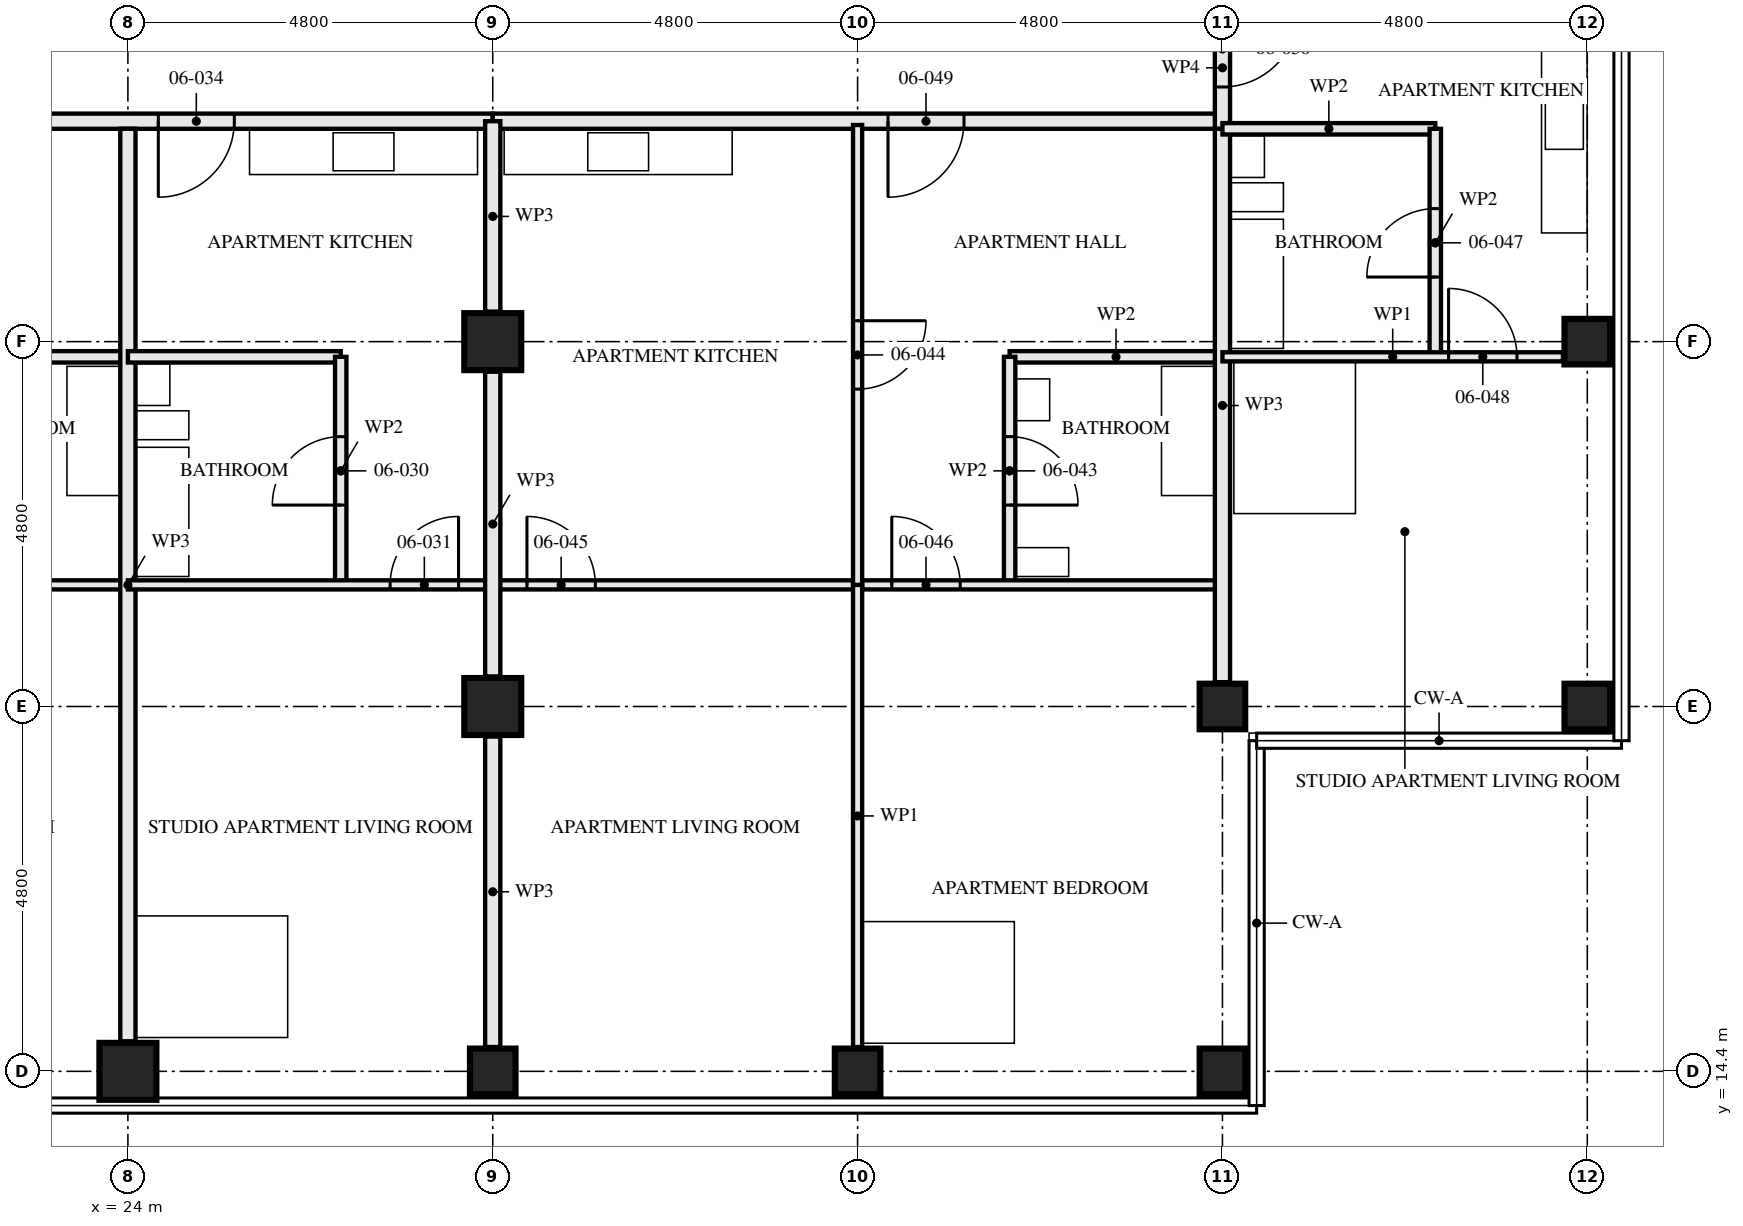
"""IFC4 building model, lengths in metres.
Left out: names, types, materials, properties, quantities, classifications, styles, units other than length and angle.
Written with IfcOpenShell. Run it as: python <this file> out.ifc"""

import sys

from ifc_helpers import new_model, si_unit, direction, frame, frame_2d, origin, origin_2d, place, context, subcontext, project, spatial, rectangle, hollow_rectangle, extrude, element, fill, save


model = new_model("IFC4")
c1 = context("Model", 3, precision=1e-05, world=origin(), true_north=direction((0.0, 1.0)))
c2 = subcontext(c1, "Body", "Model", "MODEL_VIEW")
j1 = project(units=[si_unit("LENGTHUNIT", "METRE"), si_unit("PLANEANGLEUNIT", "RADIAN")], contexts=[c1])
p1 = place(None, origin())
s1 = spatial("IfcSite", under=j1, at=p1, CompositionType="ELEMENT")
p2 = place(p1, origin())
s2 = spatial("IfcBuilding", under=s1, at=p2, CompositionType="ELEMENT")
p3 = place(p2, frame((0.0, 0.0, 27.0)))
s3 = spatial("IfcBuildingStorey", under=s2, at=p3, CompositionType="ELEMENT", Elevation=27.0)
p4 = place(p3, frame((24.0, 14.4, 0.0), z_axis=(0.0, 0.0, 1.0), x_axis=(0.0, 1.0, 0.0)))
e1 = element("IfcColumn", 1, at=p4, inside=s3, PredefinedType="COLUMN", context=c2, shape_type="SweptSolid", body=[
    extrude(hollow_rectangle(XDim=0.75, YDim=0.75, WallThickness=0.08, at=origin_2d()), origin(), (0.0, 0.0, 1.0), 3.5),
])
p5 = place(p3, frame((28.8, 14.4, 0.0), z_axis=(0.0, 0.0, 1.0), x_axis=(0.0, 1.0, 0.0)))
e2 = element("IfcColumn", 2, at=p5, inside=s3, PredefinedType="COLUMN", context=c2, shape_type="SweptSolid", body=[
    extrude(hollow_rectangle(XDim=0.6, YDim=0.6, WallThickness=0.08, at=origin_2d()), origin(), (0.0, 0.0, 1.0), 3.5),
])
for number, where, z_axis, x_axis in (
    (3, (28.8, 19.2, 0.0), (0.0, 0.0, 1.0), (1.0, 0.0, 0.0)),
    (4, (28.8, 24.0, 0.0), (0.0, 0.0, 1.0), (1.0, 0.0, 0.0)),
):
    element("IfcColumn", number, at=place(p3, frame(where, z_axis=z_axis, x_axis=x_axis)), inside=s3, PredefinedType="COLUMN", context=c2, shape_type="SweptSolid", body=[
        extrude(hollow_rectangle(XDim=0.75, YDim=0.75, WallThickness=0.08, at=origin_2d()), origin(), (0.0, 0.0, 1.0), 3.5),
    ])
for number, where, z_axis, x_axis in (
    (5, (33.6, 14.4, 0.0), (0.0, 0.0, 1.0), (0.0, 1.0, 0.0)),
    (6, (38.4, 14.4, 0.0), (0.0, 0.0, 1.0), (0.0, 1.0, 0.0)),
    (7, (38.4, 19.2, 0.0), (0.0, 0.0, 1.0), (0.0, 1.0, 0.0)),
    (8, (43.2, 19.2, 0.0), (0.0, 0.0, 1.0), (0.0, 1.0, 0.0)),
    (9, (43.2, 24.0, 0.0), (0.0, 0.0, 1.0), (1.0, 0.0, 0.0)),
):
    element("IfcColumn", number, at=place(p3, frame(where, z_axis=z_axis, x_axis=x_axis)), inside=s3, PredefinedType="COLUMN", context=c2, shape_type="SweptSolid", body=[
        extrude(hollow_rectangle(XDim=0.6, YDim=0.6, WallThickness=0.08, at=origin_2d()), origin(), (0.0, 0.0, 1.0), 3.5),
    ])
p6 = place(p3, frame((21.2, 23.8, 0.0), z_axis=(0.0, 0.0, 1.0), x_axis=(1.0, 0.0, 0.0)))
e10 = element("IfcWall", 10, at=p6, inside=s3, PredefinedType="PARTITIONING", context=c2, shape_type="SweptSolid", body=[
    extrude(rectangle(XDim=2.8, YDim=0.15, at=frame_2d((1.4, 0.0))), origin(), (0.0, 0.0, 1.0), 3.33),
])
p7 = place(p3, frame((19.2, 20.8, 0.0), z_axis=(0.0, 0.0, 1.0), x_axis=(1.0, 0.0, 0.0)))
e11 = element("IfcWall", 11, at=p7, inside=s3, PredefinedType="PARTITIONING", context=c2, shape_type="SweptSolid", body=[
    extrude(rectangle(XDim=4.8, YDim=0.12, at=frame_2d((2.4, 0.0))), origin(), (0.0, 0.0, 1.0), 3.33),
])
p8 = place(p7, frame((0.45, 0.0, 0.0)))
e12 = element("IfcOpeningElement", 12, at=p8, cuts=e11, PredefinedType="OPENING", context=c2, shape_type="SweptSolid", body=[
    extrude(rectangle(XDim=0.9, YDim=2.1, at=frame_2d((0.45, 1.05))), frame((0.0, 0.071, 0.0), z_axis=(0.0, -1.0, 0.0), x_axis=(1.0, 0.0, 0.0)), (0.0, 0.0, 1.0), 0.141),
])
p9 = place(p3, frame((24.0, 14.795, 0.0), z_axis=(0.0, 0.0, 1.0), x_axis=(0.0, 1.0, 0.0)))
e13 = element("IfcWall", 13, at=p9, inside=s3, PredefinedType="PARTITIONING", context=c2, shape_type="SweptSolid", body=[
    extrude(rectangle(XDim=12.005, YDim=0.2, at=frame_2d((6.002, 0.0))), origin(), (0.0, 0.0, 1.0), 2.55),
])
p10 = place(p3, frame((26.8, 20.8, 0.0), z_axis=(0.0, 0.0, 1.0), x_axis=(0.0, 1.0, 0.0)))
e14 = element("IfcWall", 14, at=p10, inside=s3, PredefinedType="PARTITIONING", context=c2, shape_type="SweptSolid", body=[
    extrude(rectangle(XDim=3.0, YDim=0.15, at=frame_2d((1.5, 0.0))), origin(), (0.0, 0.0, 1.0), 3.33),
])
p11 = place(p10, frame((1.05, 0.0, 0.0)))
e15 = element("IfcOpeningElement", 15, at=p11, cuts=e14, PredefinedType="OPENING", context=c2, shape_type="SweptSolid", body=[
    extrude(rectangle(XDim=0.9, YDim=2.1, at=frame_2d((0.45, 1.05))), frame((0.0, 0.085, 0.0), z_axis=(0.0, -1.0, 0.0), x_axis=(1.0, 0.0, 0.0)), (0.0, 0.0, 1.0), 0.171),
])
p12 = place(p3, frame((24.0, 23.8, 0.0), z_axis=(0.0, 0.0, 1.0), x_axis=(1.0, 0.0, 0.0)))
e16 = element("IfcWall", 16, at=p12, inside=s3, PredefinedType="PARTITIONING", context=c2, shape_type="SweptSolid", body=[
    extrude(rectangle(XDim=2.8, YDim=0.15, at=frame_2d((1.4, 0.0))), origin(), (0.0, 0.0, 1.0), 3.33),
])
p13 = place(p3, frame((24.0, 20.8, 0.0), z_axis=(0.0, 0.0, 1.0), x_axis=(1.0, 0.0, 0.0)))
e17 = element("IfcWall", 17, at=p13, inside=s3, PredefinedType="PARTITIONING", context=c2, shape_type="SweptSolid", body=[
    extrude(rectangle(XDim=4.8, YDim=0.12, at=frame_2d((2.4, 0.0))), origin(), (0.0, 0.0, 1.0), 3.33),
])
p14 = place(p13, frame((3.45, 0.0, 0.0)))
e18 = element("IfcOpeningElement", 18, at=p14, cuts=e17, PredefinedType="OPENING", context=c2, shape_type="SweptSolid", body=[
    extrude(rectangle(XDim=0.9, YDim=2.1, at=frame_2d((0.45, 1.05))), frame((0.0, 0.071, 0.0), z_axis=(0.0, -1.0, 0.0), x_axis=(1.0, 0.0, 0.0)), (0.0, 0.0, 1.0), 0.141),
])
p15 = place(p3, frame((14.4, 26.9, 0.0), z_axis=(0.0, 0.0, 1.0), x_axis=(1.0, 0.0, 0.0)))
e19 = element("IfcWall", 19, at=p15, inside=s3, PredefinedType="PARTITIONING", context=c2, shape_type="SweptSolid", body=[
    extrude(rectangle(XDim=14.4, YDim=0.2, at=frame_2d((7.2, 0.0))), origin(), (0.0, 0.0, 1.0), 2.55),
])
p16 = place(p15, frame((1.4, 0.0, 0.0)))
e20 = element("IfcOpeningElement", 20, at=p16, cuts=e19, PredefinedType="OPENING", context=c2, shape_type="SweptSolid", body=[
    extrude(rectangle(XDim=1.0, YDim=2.1, at=frame_2d((0.5, 1.05))), frame((0.0, 0.111, 0.0), z_axis=(0.0, -1.0, 0.0), x_axis=(1.0, 0.0, 0.0)), (0.0, 0.0, 1.0), 0.221),
])
p17 = place(p15, frame((5.2, 0.0, 0.0)))
e21 = element("IfcOpeningElement", 21, at=p17, cuts=e19, PredefinedType="OPENING", context=c2, shape_type="SweptSolid", body=[
    extrude(rectangle(XDim=1.0, YDim=2.1, at=frame_2d((0.5, 1.05))), frame((0.0, 0.111, 0.0), z_axis=(0.0, -1.0, 0.0), x_axis=(1.0, 0.0, 0.0)), (0.0, 0.0, 1.0), 0.221),
])
p18 = place(p15, frame((10.0, 0.0, 0.0)))
e22 = element("IfcOpeningElement", 22, at=p18, cuts=e19, PredefinedType="OPENING", context=c2, shape_type="SweptSolid", body=[
    extrude(rectangle(XDim=1.0, YDim=2.1, at=frame_2d((0.5, 1.05))), frame((0.0, 0.111, 0.0), z_axis=(0.0, -1.0, 0.0), x_axis=(1.0, 0.0, 0.0)), (0.0, 0.0, 1.0), 0.221),
])
p19 = place(p3, frame((35.6, 20.8, 0.0), z_axis=(0.0, 0.0, 1.0), x_axis=(0.0, 1.0, 0.0)))
e23 = element("IfcWall", 23, at=p19, inside=s3, PredefinedType="PARTITIONING", context=c2, shape_type="SweptSolid", body=[
    extrude(rectangle(XDim=3.0, YDim=0.15, at=frame_2d((1.5, 0.0))), origin(), (0.0, 0.0, 1.0), 3.33),
])
p20 = place(p19, frame((1.05, 0.0, 0.0)))
e24 = element("IfcOpeningElement", 24, at=p20, cuts=e23, PredefinedType="OPENING", context=c2, shape_type="SweptSolid", body=[
    extrude(rectangle(XDim=0.9, YDim=2.1, at=frame_2d((0.45, 1.05))), frame((0.0, 0.085, 0.0), z_axis=(0.0, -1.0, 0.0), x_axis=(1.0, 0.0, 0.0)), (0.0, 0.0, 1.0), 0.171),
])
p21 = place(p3, frame((35.6, 23.8, 0.0), z_axis=(0.0, 0.0, 1.0), x_axis=(1.0, 0.0, 0.0)))
e25 = element("IfcWall", 25, at=p21, inside=s3, PredefinedType="PARTITIONING", context=c2, shape_type="SweptSolid", body=[
    extrude(rectangle(XDim=2.8, YDim=0.15, at=frame_2d((1.4, 0.0))), origin(), (0.0, 0.0, 1.0), 3.33),
])
p22 = place(p3, frame((33.6, 20.8, 0.0), z_axis=(0.0, 0.0, 1.0), x_axis=(0.0, 1.0, 0.0)))
e26 = element("IfcWall", 26, at=p22, inside=s3, PredefinedType="PARTITIONING", context=c2, shape_type="SweptSolid", body=[
    extrude(rectangle(XDim=6.05, YDim=0.12, at=frame_2d((3.025, 0.0))), origin(), (0.0, 0.0, 1.0), 2.55),
])
p23 = place(p22, frame((2.575, 0.0, 0.0)))
e27 = element("IfcOpeningElement", 27, at=p23, cuts=e26, PredefinedType="OPENING", context=c2, shape_type="SweptSolid", body=[
    extrude(rectangle(XDim=0.9, YDim=2.1, at=frame_2d((0.45, 1.05))), frame((0.0, 0.071, 0.0), z_axis=(0.0, -1.0, 0.0), x_axis=(1.0, 0.0, 0.0)), (0.0, 0.0, 1.0), 0.141),
])
p24 = place(p3, frame((28.8, 20.8, 0.0), z_axis=(0.0, 0.0, 1.0), x_axis=(1.0, 0.0, 0.0)))
e28 = element("IfcWall", 28, at=p24, inside=s3, PredefinedType="PARTITIONING", context=c2, shape_type="SweptSolid", body=[
    extrude(rectangle(XDim=4.8, YDim=0.12, at=frame_2d((2.4, 0.0))), origin(), (0.0, 0.0, 1.0), 3.33),
])
p25 = place(p24, frame((0.45, 0.0, 0.0)))
e29 = element("IfcOpeningElement", 29, at=p25, cuts=e28, PredefinedType="OPENING", context=c2, shape_type="SweptSolid", body=[
    extrude(rectangle(XDim=0.9, YDim=2.1, at=frame_2d((0.45, 1.05))), frame((0.0, 0.071, 0.0), z_axis=(0.0, -1.0, 0.0), x_axis=(1.0, 0.0, 0.0)), (0.0, 0.0, 1.0), 0.141),
])
p26 = place(p3, frame((33.6, 20.8, 0.0), z_axis=(0.0, 0.0, 1.0), x_axis=(1.0, 0.0, 0.0)))
e30 = element("IfcWall", 30, at=p26, inside=s3, PredefinedType="PARTITIONING", context=c2, shape_type="SweptSolid", body=[
    extrude(rectangle(XDim=4.8, YDim=0.12, at=frame_2d((2.4, 0.0))), origin(), (0.0, 0.0, 1.0), 3.33),
])
p27 = place(p26, frame((0.45, 0.0, 0.0)))
e31 = element("IfcOpeningElement", 31, at=p27, cuts=e30, PredefinedType="OPENING", context=c2, shape_type="SweptSolid", body=[
    extrude(rectangle(XDim=0.9, YDim=2.1, at=frame_2d((0.45, 1.05))), frame((0.0, 0.071, 0.0), z_axis=(0.0, -1.0, 0.0), x_axis=(1.0, 0.0, 0.0)), (0.0, 0.0, 1.0), 0.141),
])
p28 = place(p3, frame((33.6, 14.72, 0.0), z_axis=(0.0, 0.0, 1.0), x_axis=(0.0, 1.0, 0.0)))
e32 = element("IfcWall", 32, at=p28, inside=s3, PredefinedType="PARTITIONING", context=c2, shape_type="SweptSolid", body=[
    extrude(rectangle(XDim=6.08, YDim=0.12, at=frame_2d((3.04, 0.0))), origin(), (0.0, 0.0, 1.0), 2.55),
])
p29 = place(p3, frame((38.4, 19.52, 0.0), z_axis=(0.0, 0.0, 1.0), x_axis=(0.0, 1.0, 0.0)))
e33 = element("IfcWall", 33, at=p29, inside=s3, PredefinedType="PARTITIONING", context=c2, shape_type="SweptSolid", body=[
    extrude(rectangle(XDim=7.28, YDim=0.2, at=frame_2d((3.64, 0.0))), origin(), (0.0, 0.0, 1.0), 2.55),
])
p30 = place(p3, frame((41.2, 23.8, 0.0), z_axis=(0.0, 0.0, 1.0), x_axis=(0.0, 1.0, 0.0)))
e34 = element("IfcWall", 34, at=p30, inside=s3, PredefinedType="PARTITIONING", context=c2, shape_type="SweptSolid", body=[
    extrude(rectangle(XDim=3.0, YDim=0.15, at=frame_2d((1.5, 0.0))), origin(), (0.0, 0.0, 1.0), 2.55),
])
p31 = place(p30, frame((1.05, 0.0, 0.0)))
e35 = element("IfcOpeningElement", 35, at=p31, cuts=e34, PredefinedType="OPENING", context=c2, shape_type="SweptSolid", body=[
    extrude(rectangle(XDim=0.9, YDim=2.1, at=frame_2d((0.45, 1.05))), frame((0.0, 0.085, 0.0), z_axis=(0.0, -1.0, 0.0), x_axis=(1.0, 0.0, 0.0)), (0.0, 0.0, 1.0), 0.171),
])
p32 = place(p3, frame((38.4, 26.8, 0.0), z_axis=(0.0, 0.0, 1.0), x_axis=(1.0, 0.0, 0.0)))
e36 = element("IfcWall", 36, at=p32, inside=s3, PredefinedType="PARTITIONING", context=c2, shape_type="SweptSolid", body=[
    extrude(rectangle(XDim=2.8, YDim=0.15, at=frame_2d((1.4, 0.0))), origin(), (0.0, 0.0, 1.0), 3.33),
])
p33 = place(p3, frame((38.4, 23.8, 0.0), z_axis=(0.0, 0.0, 1.0), x_axis=(1.0, 0.0, 0.0)))
e37 = element("IfcWall", 37, at=p33, inside=s3, PredefinedType="PARTITIONING", context=c2, shape_type="SweptSolid", body=[
    extrude(rectangle(XDim=4.48, YDim=0.12, at=frame_2d((2.24, 0.0))), origin(), (0.0, 0.0, 1.0), 3.33),
])
p34 = place(p33, frame((2.975, 0.0, 0.0)))
e38 = element("IfcOpeningElement", 38, at=p34, cuts=e37, PredefinedType="OPENING", context=c2, shape_type="SweptSolid", body=[
    extrude(rectangle(XDim=0.9, YDim=2.1, at=frame_2d((0.45, 1.05))), frame((0.0, 0.071, 0.0), z_axis=(0.0, -1.0, 0.0), x_axis=(1.0, 0.0, 0.0)), (0.0, 0.0, 1.0), 0.141),
])
p35 = place(p3, frame((28.8, 26.9, 0.0), z_axis=(0.0, 0.0, 1.0), x_axis=(1.0, 0.0, 0.0)))
e39 = element("IfcWall", 39, at=p35, inside=s3, PredefinedType="PARTITIONING", context=c2, shape_type="SweptSolid", body=[
    extrude(rectangle(XDim=9.6, YDim=0.2, at=frame_2d((4.8, 0.0))), origin(), (0.0, 0.0, 1.0), 3.33),
])
p36 = place(p35, frame((5.2, 0.0, 0.0)))
e40 = element("IfcOpeningElement", 40, at=p36, cuts=e39, PredefinedType="OPENING", context=c2, shape_type="SweptSolid", body=[
    extrude(rectangle(XDim=1.0, YDim=2.1, at=frame_2d((0.5, 1.05))), frame((0.0, 0.111, 0.0), z_axis=(0.0, -1.0, 0.0), x_axis=(1.0, 0.0, 0.0)), (0.0, 0.0, 1.0), 0.221),
])
p37 = place(p3, frame((38.4, 26.8, 0.0), z_axis=(0.0, 0.0, 1.0), x_axis=(0.0, 1.0, 0.0)))
e41 = element("IfcWall", 41, at=p37, inside=s3, PredefinedType="PARTITIONING", context=c2, shape_type="SweptSolid", body=[
    extrude(rectangle(XDim=1.605, YDim=0.2, at=frame_2d((0.802, 0.0))), origin(), (0.0, 0.0, 1.0), 3.33),
])
p38 = place(p37, frame((0.55, 0.0, 0.0)))
e42 = element("IfcOpeningElement", 42, at=p38, cuts=e41, PredefinedType="OPENING", context=c2, shape_type="SweptSolid", body=[
    extrude(rectangle(XDim=1.0, YDim=2.1, at=frame_2d((0.5, 1.05))), frame((0.0, 0.111, 0.0), z_axis=(0.0, -1.0, 0.0), x_axis=(1.0, 0.0, 0.0)), (0.0, 0.0, 1.0), 0.221),
])
p39 = place(p3, frame((28.8, 14.72, 0.0), z_axis=(0.0, 0.0, 1.0), x_axis=(0.0, 1.0, 0.0)))
e43 = element("IfcWall", 43, at=p39, inside=s3, PredefinedType="PARTITIONING", context=c2, shape_type="SweptSolid", body=[
    extrude(rectangle(XDim=4.085, YDim=0.2, at=frame_2d((2.042, 0.0))), origin(), (0.0, 0.0, 1.0), 2.32),
])
p40 = place(p3, frame((28.8, 19.595, 0.0), z_axis=(0.0, 0.0, 1.0), x_axis=(0.0, 1.0, 0.0)))
e44 = element("IfcWall", 44, at=p40, inside=s3, PredefinedType="PARTITIONING", context=c2, shape_type="SweptSolid", body=[
    extrude(rectangle(XDim=4.01, YDim=0.2, at=frame_2d((2.005, 0.0))), origin(), (0.0, 0.0, 1.0), 2.32),
])
p41 = place(p3, frame((28.8, 24.395, 0.0), z_axis=(0.0, 0.0, 1.0), x_axis=(0.0, 1.0, 0.0)))
e45 = element("IfcWall", 45, at=p41, inside=s3, PredefinedType="PARTITIONING", context=c2, shape_type="SweptSolid", body=[
    extrude(rectangle(XDim=2.505, YDim=0.2, at=frame_2d((1.252, 0.0))), origin(), (0.0, 0.0, 1.0), 2.32),
])
p42 = place(p11, origin())
e46 = element("IfcDoor", 46, at=p42, inside=s3, OperationType="SINGLE_SWING_RIGHT", PredefinedType="DOOR", context=c2, shape_type="SweptSolid", body=[
    extrude(rectangle(XDim=0.9, YDim=2.1, at=frame_2d((0.45, 1.05))), frame((0.0, 0.022, 0.0), z_axis=(0.0, -1.0, 0.0), x_axis=(1.0, 0.0, 0.0)), (0.0, 0.0, 1.0), 0.044),
])
fill(e15, e46)
p43 = place(p14, origin())
e47 = element("IfcDoor", 47, at=p43, inside=s3, OperationType="SINGLE_SWING_LEFT", PredefinedType="DOOR", context=c2, shape_type="SweptSolid", body=[
    extrude(rectangle(XDim=0.9, YDim=2.1, at=frame_2d((0.45, 1.05))), frame((0.0, 0.022, 0.0), z_axis=(0.0, -1.0, 0.0), x_axis=(1.0, 0.0, 0.0)), (0.0, 0.0, 1.0), 0.044),
])
fill(e18, e47)
p44 = place(p18, frame((1.0, 0.0, 0.0), z_axis=(0.0, 0.0, 1.0), x_axis=(-1.0, 0.0, 0.0)))
e48 = element("IfcDoor", 48, at=p44, inside=s3, OperationType="SINGLE_SWING_LEFT", PredefinedType="DOOR", context=c2, shape_type="SweptSolid", body=[
    extrude(rectangle(XDim=1.0, YDim=2.1, at=frame_2d((0.5, 1.05))), frame((0.0, 0.027, 0.0), z_axis=(0.0, -1.0, 0.0), x_axis=(1.0, 0.0, 0.0)), (0.0, 0.0, 1.0), 0.054),
])
fill(e22, e48)
p45 = place(p20, frame((0.9, 0.0, 0.0), z_axis=(0.0, 0.0, 1.0), x_axis=(-1.0, 0.0, 0.0)))
e49 = element("IfcDoor", 49, at=p45, inside=s3, OperationType="SINGLE_SWING_LEFT", PredefinedType="DOOR", context=c2, shape_type="SweptSolid", body=[
    extrude(rectangle(XDim=0.9, YDim=2.1, at=frame_2d((0.45, 1.05))), frame((0.0, 0.022, 0.0), z_axis=(0.0, -1.0, 0.0), x_axis=(1.0, 0.0, 0.0)), (0.0, 0.0, 1.0), 0.044),
])
fill(e24, e49)
p46 = place(p23, frame((0.9, 0.0, 0.0), z_axis=(0.0, 0.0, 1.0), x_axis=(-1.0, 0.0, 0.0)))
e50 = element("IfcDoor", 50, at=p46, inside=s3, OperationType="SINGLE_SWING_RIGHT", PredefinedType="DOOR", context=c2, shape_type="SweptSolid", body=[
    extrude(rectangle(XDim=0.9, YDim=2.1, at=frame_2d((0.45, 1.05))), frame((0.0, 0.022, 0.0), z_axis=(0.0, -1.0, 0.0), x_axis=(1.0, 0.0, 0.0)), (0.0, 0.0, 1.0), 0.044),
])
fill(e27, e50)
p47 = place(p25, origin())
e51 = element("IfcDoor", 51, at=p47, inside=s3, OperationType="SINGLE_SWING_RIGHT", PredefinedType="DOOR", context=c2, shape_type="SweptSolid", body=[
    extrude(rectangle(XDim=0.9, YDim=2.1, at=frame_2d((0.45, 1.05))), frame((0.0, 0.022, 0.0), z_axis=(0.0, -1.0, 0.0), x_axis=(1.0, 0.0, 0.0)), (0.0, 0.0, 1.0), 0.044),
])
fill(e29, e51)
p48 = place(p27, origin())
e52 = element("IfcDoor", 52, at=p48, inside=s3, OperationType="SINGLE_SWING_RIGHT", PredefinedType="DOOR", context=c2, shape_type="SweptSolid", body=[
    extrude(rectangle(XDim=0.9, YDim=2.1, at=frame_2d((0.45, 1.05))), frame((0.0, 0.022, 0.0), z_axis=(0.0, -1.0, 0.0), x_axis=(1.0, 0.0, 0.0)), (0.0, 0.0, 1.0), 0.044),
])
fill(e31, e52)
p49 = place(p31, origin())
e53 = element("IfcDoor", 53, at=p49, inside=s3, OperationType="SINGLE_SWING_RIGHT", PredefinedType="DOOR", context=c2, shape_type="SweptSolid", body=[
    extrude(rectangle(XDim=0.9, YDim=2.1, at=frame_2d((0.45, 1.05))), frame((0.0, 0.022, 0.0), z_axis=(0.0, -1.0, 0.0), x_axis=(1.0, 0.0, 0.0)), (0.0, 0.0, 1.0), 0.044),
])
fill(e35, e53)
p50 = place(p34, origin())
e54 = element("IfcDoor", 54, at=p50, inside=s3, OperationType="SINGLE_SWING_RIGHT", PredefinedType="DOOR", context=c2, shape_type="SweptSolid", body=[
    extrude(rectangle(XDim=0.9, YDim=2.1, at=frame_2d((0.45, 1.05))), frame((0.0, 0.022, 0.0), z_axis=(0.0, -1.0, 0.0), x_axis=(1.0, 0.0, 0.0)), (0.0, 0.0, 1.0), 0.044),
])
fill(e38, e54)
p51 = place(p36, frame((1.0, 0.0, 0.0), z_axis=(0.0, 0.0, 1.0), x_axis=(-1.0, 0.0, 0.0)))
e55 = element("IfcDoor", 55, at=p51, inside=s3, OperationType="SINGLE_SWING_LEFT", PredefinedType="DOOR", context=c2, shape_type="SweptSolid", body=[
    extrude(rectangle(XDim=1.0, YDim=2.1, at=frame_2d((0.5, 1.05))), frame((0.0, 0.027, 0.0), z_axis=(0.0, -1.0, 0.0), x_axis=(1.0, 0.0, 0.0)), (0.0, 0.0, 1.0), 0.054),
])
fill(e40, e55)
p52 = place(p38, frame((1.0, 0.0, 0.0), z_axis=(0.0, 0.0, 1.0), x_axis=(-1.0, 0.0, 0.0)))
e56 = element("IfcDoor", 56, at=p52, inside=s3, OperationType="SINGLE_SWING_RIGHT", PredefinedType="DOOR", context=c2, shape_type="SweptSolid", body=[
    extrude(rectangle(XDim=1.0, YDim=2.1, at=frame_2d((0.5, 1.05))), frame((0.0, 0.027, 0.0), z_axis=(0.0, -1.0, 0.0), x_axis=(1.0, 0.0, 0.0)), (0.0, 0.0, 1.0), 0.054),
])
fill(e42, e56)
save(model, sys.argv[1])
